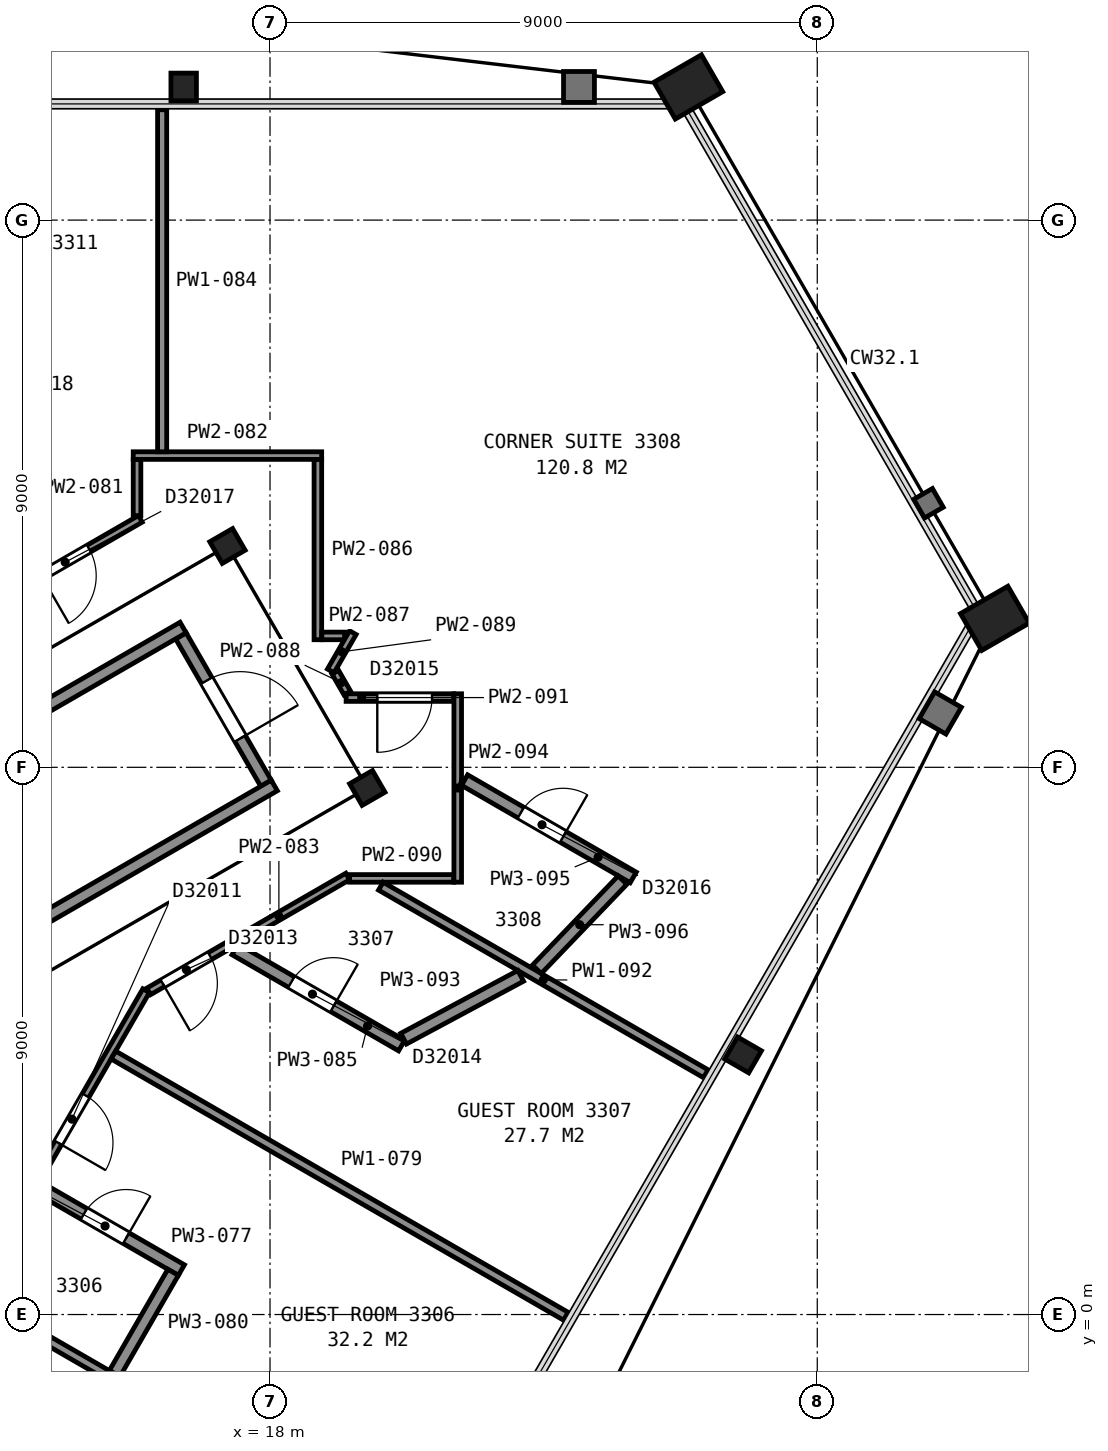
"""IFC4 building model, lengths in metres.
Left out: names, types, materials, properties, quantities, classifications, styles, units other than length and angle.
Written with IfcOpenShell. Run it as: python <this file> out.ifc"""

import sys

from ifc_helpers import new_model, si_unit, direction, frame, frame_2d, origin, origin_2d, place, context, subcontext, project, spatial, rectangle, hollow_rectangle, i_section, extrude, element, fill, save


model = new_model("IFC4")
c1 = context("Model", 3, precision=1e-05, world=origin(), true_north=direction((0.0, 1.0)))
c2 = subcontext(c1, "Body", "Model", "MODEL_VIEW")
j1 = project(units=[si_unit("LENGTHUNIT", "METRE"), si_unit("PLANEANGLEUNIT", "RADIAN")], contexts=[c1])
p1 = place(None, origin())
s1 = spatial("IfcSite", under=j1, at=p1, CompositionType="ELEMENT")
p2 = place(p1, origin())
s2 = spatial("IfcBuilding", under=s1, at=p2, CompositionType="ELEMENT")
p3 = place(p2, frame((0.0, 0.0, 136.0)))
s3 = spatial("IfcBuildingStorey", under=s2, at=p3, CompositionType="ELEMENT", Elevation=136.0)
p4 = place(p3, frame((24.88, 20.19, 0.0), z_axis=(0.0, 0.0, 1.0), x_axis=(0.5, -0.866025403784, 0.0)))
e1 = element("IfcColumn", 1, at=p4, inside=s3, PredefinedType="COLUMN", context=c2, shape_type="SweptSolid", body=[
    extrude(hollow_rectangle(XDim=0.7, YDim=0.9, WallThickness=0.065, at=origin_2d()), origin(), (0.0, 0.0, 1.0), 3.6),
])
for number, where, z_axis, x_axis in (
    (2, (16.58, 20.19, 0.0), (0.0, 0.0, 1.0), (1.0, 0.0, 0.0)),
    (3, (25.78, 4.27, 0.0), (0.0, 0.0, 1.0), (-0.5, -0.866, 0.0)),
):
    element("IfcColumn", number, at=place(p3, frame(where, z_axis=z_axis, x_axis=x_axis)), inside=s3, PredefinedType="COLUMN", context=c2, shape_type="SweptSolid", body=[
        extrude(i_section(OverallWidth=0.419, OverallDepth=0.455, WebThickness=0.042, FlangeThickness=0.068, FilletRadius=0.015, at=origin_2d()), origin(), (0.0, 0.0, 1.0), 3.6),
    ])
p5 = place(p3, frame((29.92, 11.45, 0.0), z_axis=(0.0, 0.0, 1.0), x_axis=(0.5, -0.866025403784, 0.0)))
e4 = element("IfcColumn", 4, at=p5, inside=s3, PredefinedType="COLUMN", context=c2, shape_type="SweptSolid", body=[
    extrude(hollow_rectangle(XDim=0.7, YDim=0.9, WallThickness=0.065, at=origin_2d()), origin(), (0.0, 0.0, 1.0), 3.6),
])
for number, where, z_axis, x_axis in (
    (5, (19.6, 8.66, 0.0), (0.0, 0.0, 1.0), (0.5, -0.866, 0.0)),
    (6, (17.3, 12.64, 0.0), (0.0, 0.0, 1.0), (0.5, -0.866, 0.0)),
):
    element("IfcColumn", number, at=place(p3, frame(where, z_axis=z_axis, x_axis=x_axis)), inside=s3, PredefinedType="COLUMN", context=c2, shape_type="SweptSolid", body=[
        extrude(i_section(OverallWidth=0.411, OverallDepth=0.434, WebThickness=0.036, FlangeThickness=0.057, FilletRadius=0.015, at=origin_2d()), origin(), (0.0, 0.0, 1.0), 3.6),
    ])
p6 = place(p3, frame((17.934, 8.738, 0.0), z_axis=(0.0, 0.0, 1.0), x_axis=(-0.49998411664, 0.866034573852, 0.0)))
e7 = element("IfcWall", 7, at=p6, inside=s3, PredefinedType="PARTITIONING", context=c2, shape_type="SweptSolid", body=[
    extrude(rectangle(XDim=2.8, YDim=0.2, at=frame_2d((1.4, 0.0))), origin(), (0.0, 0.0, 1.0), 3.35),
])
p7 = place(p6, frame((0.85, 0.0, 0.0)))
e8 = element("IfcOpeningElement", 8, at=p7, cuts=e7, PredefinedType="OPENING", context=c2, shape_type="SweptSolid", body=[
    extrude(rectangle(XDim=1.1, YDim=2.1, at=frame_2d((0.55, 1.05))), frame((0.0, 0.11, 0.0), z_axis=(0.0, -1.0, 0.0), x_axis=(1.0, 0.0, 0.0)), (0.0, 0.0, 1.0), 0.22),
])
for number, where, z_axis, x_axis in (
    (9, (6.178, 5.299, 0.0), (0.0, 0.0, 1.0), (0.866, 0.5, 0.0)),
    (10, (7.678, 2.701, 0.0), (0.0, 0.0, 1.0), (0.866, 0.5, 0.0)),
):
    element("IfcWall", number, at=place(p3, frame(where, z_axis=z_axis, x_axis=x_axis)), inside=s3, PredefinedType="PARTITIONING", context=c2, shape_type="SweptSolid", body=[
        extrude(rectangle(XDim=12.0, YDim=0.2, at=frame_2d((6.0, 0.0))), origin(), (0.0, 0.0, 1.0), 3.35),
    ])
p8 = place(p3, frame((15.962, 5.326, 0.0), z_axis=(0.0, 0.0, 1.0), x_axis=(-0.499992829944, -0.866029543379, 0.0)))
e11 = element("IfcWall", 11, at=p8, inside=s3, PredefinedType="PARTITIONING", context=c2, shape_type="SweptSolid", body=[
    extrude(rectangle(XDim=24.413, YDim=0.125, at=frame_2d((12.207, 0.0))), origin(), (0.0, 0.0, 1.0), 2.613),
])
p9 = place(p8, frame((21.258, 0.0, 0.0)))
e12 = element("IfcOpeningElement", 12, at=p9, cuts=e11, PredefinedType="OPENING", context=c2, shape_type="SweptSolid", body=[
    extrude(rectangle(XDim=0.9, YDim=2.1, at=frame_2d((0.45, 1.05))), frame((0.0, 0.073, 0.0), z_axis=(0.0, -1.0, 0.0), x_axis=(1.0, 0.0, 0.0)), (0.0, 0.0, 1.0), 0.145),
])
p10 = place(p8, frame((18.502, 0.0, 0.0)))
e13 = element("IfcOpeningElement", 13, at=p10, cuts=e11, PredefinedType="OPENING", context=c2, shape_type="SweptSolid", body=[
    extrude(rectangle(XDim=0.9, YDim=2.1, at=frame_2d((0.45, 1.05))), frame((0.0, 0.073, 0.0), z_axis=(0.0, -1.0, 0.0), x_axis=(1.0, 0.0, 0.0)), (0.0, 0.0, 1.0), 0.145),
])
p11 = place(p8, frame((11.799, 0.0, 0.0)))
e14 = element("IfcOpeningElement", 14, at=p11, cuts=e11, PredefinedType="OPENING", context=c2, shape_type="SweptSolid", body=[
    extrude(rectangle(XDim=0.9, YDim=2.1, at=frame_2d((0.45, 1.05))), frame((0.0, 0.073, 0.0), z_axis=(0.0, -1.0, 0.0), x_axis=(1.0, 0.0, 0.0)), (0.0, 0.0, 1.0), 0.145),
])
p12 = place(p8, frame((9.043, 0.0, 0.0)))
e15 = element("IfcOpeningElement", 15, at=p12, cuts=e11, PredefinedType="OPENING", context=c2, shape_type="SweptSolid", body=[
    extrude(rectangle(XDim=0.9, YDim=2.1, at=frame_2d((0.45, 1.05))), frame((0.0, 0.073, 0.0), z_axis=(0.0, -1.0, 0.0), x_axis=(1.0, 0.0, 0.0)), (0.0, 0.0, 1.0), 0.145),
])
p13 = place(p8, frame((1.99, 0.0, 0.0)))
e16 = element("IfcOpeningElement", 16, at=p13, cuts=e11, PredefinedType="OPENING", context=c2, shape_type="SweptSolid", body=[
    extrude(rectangle(XDim=0.9, YDim=2.1, at=frame_2d((0.45, 1.05))), frame((0.0, 0.073, 0.0), z_axis=(0.0, -1.0, 0.0), x_axis=(1.0, 0.0, 0.0)), (0.0, 0.0, 1.0), 0.145),
])
p14 = place(p3, frame((12.605, 11.203, 0.0), z_axis=(0.0, 0.0, 1.0), x_axis=(0.866113281362, 0.499847760672, 0.0)))
e17 = element("IfcWall", 17, at=p14, inside=s3, PredefinedType="PARTITIONING", context=c2, shape_type="SweptSolid", body=[
    extrude(rectangle(XDim=3.767, YDim=0.125, at=frame_2d((1.883, 0.0))), origin(), (0.0, 0.0, 1.0), 2.613),
])
p15 = place(p14, frame((1.89, 0.0, 0.0)))
e18 = element("IfcOpeningElement", 18, at=p15, cuts=e17, PredefinedType="OPENING", context=c2, shape_type="SweptSolid", body=[
    extrude(rectangle(XDim=0.9, YDim=2.1, at=frame_2d((0.45, 1.05))), frame((0.0, 0.073, 0.0), z_axis=(0.0, -1.0, 0.0), x_axis=(1.0, 0.0, 0.0)), (0.0, 0.0, 1.0), 0.145),
])
p16 = place(p3, frame((13.122, 0.281, 0.0), z_axis=(0.0, 0.0, 1.0), x_axis=(0.866029425019, -0.499993034952, 0.0)))
e19 = element("IfcWall", 19, at=p16, inside=s3, PredefinedType="PARTITIONING", context=c2, shape_type="SweptSolid", body=[
    extrude(rectangle(XDim=8.591, YDim=0.15, at=frame_2d((4.296, 0.0))), origin(), (0.0, 0.0, 1.0), 2.613),
])
p17 = place(p3, frame((16.542, 0.731, 0.0), z_axis=(0.0, 0.0, 1.0), x_axis=(-0.86596722502, 0.50010075504, 0.0)))
e20 = element("IfcWall", 20, at=p17, inside=s3, PredefinedType="PARTITIONING", context=c2, shape_type="SweptSolid", body=[
    extrude(rectangle(XDim=2.737, YDim=0.2, at=frame_2d((1.369, 0.0))), origin(), (0.0, 0.0, 1.0), 2.613),
])
p18 = place(p17, frame((1.05, 0.0, 0.0)))
e21 = element("IfcOpeningElement", 21, at=p18, cuts=e20, PredefinedType="OPENING", context=c2, shape_type="SweptSolid", body=[
    extrude(rectangle(XDim=0.8, YDim=2.1, at=frame_2d((0.4, 1.05))), frame((0.0, 0.11, 0.0), z_axis=(0.0, -1.0, 0.0), x_axis=(1.0, 0.0, 0.0)), (0.0, 0.0, 1.0), 0.22),
])
p19 = place(p3, frame((15.424, 4.268, 0.0), z_axis=(0.0, 0.0, 1.0), x_axis=(0.866022320763, -0.500005339912, 0.0)))
e22 = element("IfcWall", 22, at=p19, inside=s3, PredefinedType="PARTITIONING", context=c2, shape_type="SweptSolid", body=[
    extrude(rectangle(XDim=8.591, YDim=0.15, at=frame_2d((4.296, 0.0))), origin(), (0.0, 0.0, 1.0), 2.613),
])
p20 = place(p3, frame((15.446, -0.969, 0.0), z_axis=(0.0, 0.0, 1.0), x_axis=(0.499913221443, 0.866075499611, 0.0)))
e23 = element("IfcWall", 23, at=p20, inside=s3, PredefinedType="PARTITIONING", context=c2, shape_type="SweptSolid", body=[
    extrude(rectangle(XDim=1.92, YDim=0.2, at=frame_2d((0.96, 0.0))), origin(), (0.0, 0.0, 1.0), 2.613),
])
p21 = place(p3, frame((15.813, 13.14, 0.0), z_axis=(0.0, 0.0, 1.0), x_axis=(0.0, 1.0, 0.0)))
e24 = element("IfcWall", 24, at=p21, inside=s3, PredefinedType="PARTITIONING", context=c2, shape_type="SweptSolid", body=[
    extrude(rectangle(XDim=0.922, YDim=0.125, at=frame_2d((0.461, 0.0))), origin(), (0.0, 0.0, 1.0), 2.613),
])
p22 = place(p3, frame((15.75, 14.127, 0.0), z_axis=(0.0, 0.0, 1.0), x_axis=(1.0, 0.0, 0.0)))
e25 = element("IfcWall", 25, at=p22, inside=s3, PredefinedType="PARTITIONING", context=c2, shape_type="SweptSolid", body=[
    extrude(rectangle(XDim=3.099, YDim=0.125, at=frame_2d((1.55, 0.0))), origin(), (0.0, 0.0, 1.0), 2.613),
])
p23 = place(p3, frame((19.278, 7.204, 0.0), z_axis=(0.0, 0.0, 1.0), x_axis=(-0.866028547684, -0.499994554566, 0.0)))
e26 = element("IfcWall", 26, at=p23, inside=s3, PredefinedType="PARTITIONING", context=c2, shape_type="SweptSolid", body=[
    extrude(rectangle(XDim=3.78, YDim=0.125, at=frame_2d((1.89, 0.0))), origin(), (0.0, 0.0, 1.0), 2.613),
])
p24 = place(p23, frame((2.615, 0.0, 0.0)))
e27 = element("IfcOpeningElement", 27, at=p24, cuts=e26, PredefinedType="OPENING", context=c2, shape_type="SweptSolid", body=[
    extrude(rectangle(XDim=0.9, YDim=2.1, at=frame_2d((0.45, 1.05))), frame((0.0, 0.073, 0.0), z_axis=(0.0, -1.0, 0.0), x_axis=(1.0, 0.0, 0.0)), (0.0, 0.0, 1.0), 0.145),
])
p25 = place(p3, frame((16.226, 14.189, 0.0), z_axis=(0.0, 0.0, 1.0), x_axis=(0.0, 1.0, 0.0)))
e28 = element("IfcWall", 28, at=p25, inside=s3, PredefinedType="PARTITIONING", context=c2, shape_type="SweptSolid", body=[
    extrude(rectangle(XDim=5.625, YDim=0.15, at=frame_2d((2.813, 0.0))), origin(), (0.0, 0.0, 1.0), 2.613),
])
p26 = place(p3, frame((17.425, 6.004, 0.0), z_axis=(0.0, 0.0, 1.0), x_axis=(0.866145753309, -0.499791490549, 0.0)))
e29 = element("IfcWall", 29, at=p26, inside=s3, PredefinedType="PARTITIONING", context=c2, shape_type="SweptSolid", body=[
    extrude(rectangle(XDim=3.163, YDim=0.2, at=frame_2d((1.582, 0.0))), origin(), (0.0, 0.0, 1.0), 2.613),
])
p27 = place(p26, frame((1.07, 0.0, 0.0)))
e30 = element("IfcOpeningElement", 30, at=p27, cuts=e29, PredefinedType="OPENING", context=c2, shape_type="SweptSolid", body=[
    extrude(rectangle(XDim=0.8, YDim=2.1, at=frame_2d((0.4, 1.05))), frame((0.0, 0.11, 0.0), z_axis=(0.0, -1.0, 0.0), x_axis=(1.0, 0.0, 0.0)), (0.0, 0.0, 1.0), 0.22),
])
p28 = place(p3, frame((18.787, 11.098, 0.0), z_axis=(0.0, 0.0, 1.0), x_axis=(0.0, 1.0, 0.0)))
e31 = element("IfcWall", 31, at=p28, inside=s3, PredefinedType="PARTITIONING", context=c2, shape_type="SweptSolid", body=[
    extrude(rectangle(XDim=2.964, YDim=0.125, at=frame_2d((1.482, 0.0))), origin(), (0.0, 0.0, 1.0), 2.613),
])
p29 = place(p3, frame((18.852, 11.161, 0.0), z_axis=(0.0, 0.0, 1.0), x_axis=(1.0, 0.0, 0.0)))
e32 = element("IfcWall", 32, at=p29, inside=s3, PredefinedType="PARTITIONING", context=c2, shape_type="SweptSolid", body=[
    extrude(rectangle(XDim=0.374, YDim=0.125, at=frame_2d((0.187, 0.0))), origin(), (0.0, 0.0, 1.0), 2.613),
])
p30 = place(p3, frame((19.073, 10.565, 0.0), z_axis=(0.0, 0.0, 1.0), x_axis=(0.499899443193, -0.866083452501, 0.0)))
e33 = element("IfcWall", 33, at=p30, inside=s3, PredefinedType="PARTITIONING", context=c2, shape_type="SweptSolid", body=[
    extrude(rectangle(XDim=0.398, YDim=0.125, at=frame_2d((0.199, 0.0))), origin(), (0.0, 0.0, 1.0), 2.613),
])
p31 = place(p3, frame((18.999, 10.585, 0.0), z_axis=(0.0, 0.0, 1.0), x_axis=(0.499712769023, 0.866191173169, 0.0)))
e34 = element("IfcWall", 34, at=p31, inside=s3, PredefinedType="PARTITIONING", context=c2, shape_type="SweptSolid", body=[
    extrude(rectangle(XDim=0.728, YDim=0.125, at=frame_2d((0.364, 0.0))), origin(), (0.0, 0.0, 1.0), 2.613),
])
p32 = place(p3, frame((19.309, 7.173, 0.0), z_axis=(0.0, 0.0, 1.0), x_axis=(1.0, 0.0, 0.0)))
e35 = element("IfcWall", 35, at=p32, inside=s3, PredefinedType="PARTITIONING", context=c2, shape_type="SweptSolid", body=[
    extrude(rectangle(XDim=1.713, YDim=0.125, at=frame_2d((0.856, 0.0))), origin(), (0.0, 0.0, 1.0), 2.613),
])
p33 = place(p3, frame((19.251, 10.147, 0.0), z_axis=(0.0, 0.0, 1.0), x_axis=(1.0, 0.0, 0.0)))
e36 = element("IfcWall", 36, at=p33, inside=s3, PredefinedType="PARTITIONING", context=c2, shape_type="SweptSolid", body=[
    extrude(rectangle(XDim=1.771, YDim=0.125, at=frame_2d((0.885, 0.0))), origin(), (0.0, 0.0, 1.0), 2.613),
])
p34 = place(p33, frame((0.512, 0.0, 0.0)))
e37 = element("IfcOpeningElement", 37, at=p34, cuts=e36, PredefinedType="OPENING", context=c2, shape_type="SweptSolid", body=[
    extrude(rectangle(XDim=0.9, YDim=2.1, at=frame_2d((0.45, 1.05))), frame((0.0, 0.073, 0.0), z_axis=(0.0, -1.0, 0.0), x_axis=(1.0, 0.0, 0.0)), (0.0, 0.0, 1.0), 0.145),
])
p35 = place(p3, frame((19.822, 7.046, 0.0), z_axis=(0.0, 0.0, 1.0), x_axis=(0.866041323853, -0.499972424619, 0.0)))
e38 = element("IfcWall", 38, at=p35, inside=s3, PredefinedType="PARTITIONING", context=c2, shape_type="SweptSolid", body=[
    extrude(rectangle(XDim=6.172, YDim=0.15, at=frame_2d((3.086, 0.0))), origin(), (0.0, 0.0, 1.0), 2.613),
])
p36 = place(p3, frame((20.197, 4.537, 0.0), z_axis=(0.0, 0.0, 1.0), x_axis=(0.881162538645, 0.472813473253, 0.0)))
e39 = element("IfcWall", 39, at=p36, inside=s3, PredefinedType="PARTITIONING", context=c2, shape_type="SweptSolid", body=[
    extrude(rectangle(XDim=2.185, YDim=0.2, at=frame_2d((1.093, 0.0))), origin(), (0.0, 0.0, 1.0), 2.613),
])
p37 = place(p3, frame((21.087, 7.111, 0.0), z_axis=(0.0, 0.0, 1.0), x_axis=(0.0, 1.0, 0.0)))
e40 = element("IfcWall", 40, at=p37, inside=s3, PredefinedType="PARTITIONING", context=c2, shape_type="SweptSolid", body=[
    extrude(rectangle(XDim=3.099, YDim=0.125, at=frame_2d((1.549, 0.0))), origin(), (0.0, 0.0, 1.0), 2.613),
])
p38 = place(p3, frame((23.974, 7.189, 0.0), z_axis=(0.0, 0.0, 1.0), x_axis=(-0.866105631149, 0.499861016376, 0.0)))
e41 = element("IfcWall", 41, at=p38, inside=s3, PredefinedType="PARTITIONING", context=c2, shape_type="SweptSolid", body=[
    extrude(rectangle(XDim=3.203, YDim=0.2, at=frame_2d((1.602, 0.0))), origin(), (0.0, 0.0, 1.0), 2.613),
])
p39 = place(p38, frame((1.333, 0.0, 0.0)))
e42 = element("IfcOpeningElement", 42, at=p39, cuts=e41, PredefinedType="OPENING", context=c2, shape_type="SweptSolid", body=[
    extrude(rectangle(XDim=0.8, YDim=2.1, at=frame_2d((0.4, 1.05))), frame((0.0, 0.11, 0.0), z_axis=(0.0, -1.0, 0.0), x_axis=(1.0, 0.0, 0.0)), (0.0, 0.0, 1.0), 0.22),
])
p40 = place(p3, frame((22.388, 5.677, 0.0), z_axis=(0.0, 0.0, 1.0), x_axis=(0.692374421384, 0.721538398572, 0.0)))
e43 = element("IfcWall", 43, at=p40, inside=s3, PredefinedType="PARTITIONING", context=c2, shape_type="SweptSolid", body=[
    extrude(rectangle(XDim=2.034, YDim=0.2, at=frame_2d((1.017, 0.0))), origin(), (0.0, 0.0, 1.0), 2.613),
])
p41 = place(p7, origin())
e44 = element("IfcDoor", 44, at=p41, inside=s3, OperationType="SINGLE_SWING_LEFT", PredefinedType="DOOR", context=c2, shape_type="SweptSolid", body=[
    extrude(rectangle(XDim=1.1, YDim=2.1, at=frame_2d((0.55, 1.05))), frame((0.0, 0.025, 0.0), z_axis=(0.0, -1.0, 0.0), x_axis=(1.0, 0.0, 0.0)), (0.0, 0.0, 1.0), 0.05),
])
fill(e8, e44)
p42 = place(p13, origin())
e45 = element("IfcDoor", 45, at=p42, inside=s3, OperationType="SINGLE_SWING_RIGHT", PredefinedType="DOOR", context=c2, shape_type="SweptSolid", body=[
    extrude(rectangle(XDim=0.9, YDim=2.1, at=frame_2d((0.45, 1.05))), frame((0.0, 0.025, 0.0), z_axis=(0.0, -1.0, 0.0), x_axis=(1.0, 0.0, 0.0)), (0.0, 0.0, 1.0), 0.05),
])
fill(e16, e45)
p43 = place(p15, origin())
e46 = element("IfcDoor", 46, at=p43, inside=s3, OperationType="SINGLE_SWING_LEFT", PredefinedType="DOOR", context=c2, shape_type="SweptSolid", body=[
    extrude(rectangle(XDim=0.9, YDim=2.1, at=frame_2d((0.45, 1.05))), frame((0.0, 0.025, 0.0), z_axis=(0.0, -1.0, 0.0), x_axis=(1.0, 0.0, 0.0)), (0.0, 0.0, 1.0), 0.05),
])
fill(e18, e46)
p44 = place(p18, origin())
e47 = element("IfcDoor", 47, at=p44, inside=s3, OperationType="SINGLE_SWING_LEFT", PredefinedType="DOOR", context=c2, shape_type="SweptSolid", body=[
    extrude(rectangle(XDim=0.8, YDim=2.1, at=frame_2d((0.4, 1.05))), frame((0.0, 0.025, 0.0), z_axis=(0.0, -1.0, 0.0), x_axis=(1.0, 0.0, 0.0)), (0.0, 0.0, 1.0), 0.05),
])
fill(e21, e47)
p45 = place(p24, origin())
e48 = element("IfcDoor", 48, at=p45, inside=s3, OperationType="SINGLE_SWING_RIGHT", PredefinedType="DOOR", context=c2, shape_type="SweptSolid", body=[
    extrude(rectangle(XDim=0.9, YDim=2.1, at=frame_2d((0.45, 1.05))), frame((0.0, 0.025, 0.0), z_axis=(0.0, -1.0, 0.0), x_axis=(1.0, 0.0, 0.0)), (0.0, 0.0, 1.0), 0.05),
])
fill(e27, e48)
p46 = place(p27, origin())
e49 = element("IfcDoor", 49, at=p46, inside=s3, OperationType="SINGLE_SWING_RIGHT", PredefinedType="DOOR", context=c2, shape_type="SweptSolid", body=[
    extrude(rectangle(XDim=0.8, YDim=2.1, at=frame_2d((0.4, 1.05))), frame((0.0, 0.025, 0.0), z_axis=(0.0, -1.0, 0.0), x_axis=(1.0, 0.0, 0.0)), (0.0, 0.0, 1.0), 0.05),
])
fill(e30, e49)
p47 = place(p34, origin())
e50 = element("IfcDoor", 50, at=p47, inside=s3, OperationType="SINGLE_SWING_LEFT", PredefinedType="DOOR", context=c2, shape_type="SweptSolid", body=[
    extrude(rectangle(XDim=0.9, YDim=2.1, at=frame_2d((0.45, 1.05))), frame((0.0, 0.025, 0.0), z_axis=(0.0, -1.0, 0.0), x_axis=(1.0, 0.0, 0.0)), (0.0, 0.0, 1.0), 0.05),
])
fill(e37, e50)
p48 = place(p39, origin())
e51 = element("IfcDoor", 51, at=p48, inside=s3, OperationType="SINGLE_SWING_LEFT", PredefinedType="DOOR", context=c2, shape_type="SweptSolid", body=[
    extrude(rectangle(XDim=0.8, YDim=2.1, at=frame_2d((0.4, 1.05))), frame((0.0, 0.025, 0.0), z_axis=(0.0, -1.0, 0.0), x_axis=(1.0, 0.0, 0.0)), (0.0, 0.0, 1.0), 0.05),
])
fill(e42, e51)
save(model, sys.argv[1])
